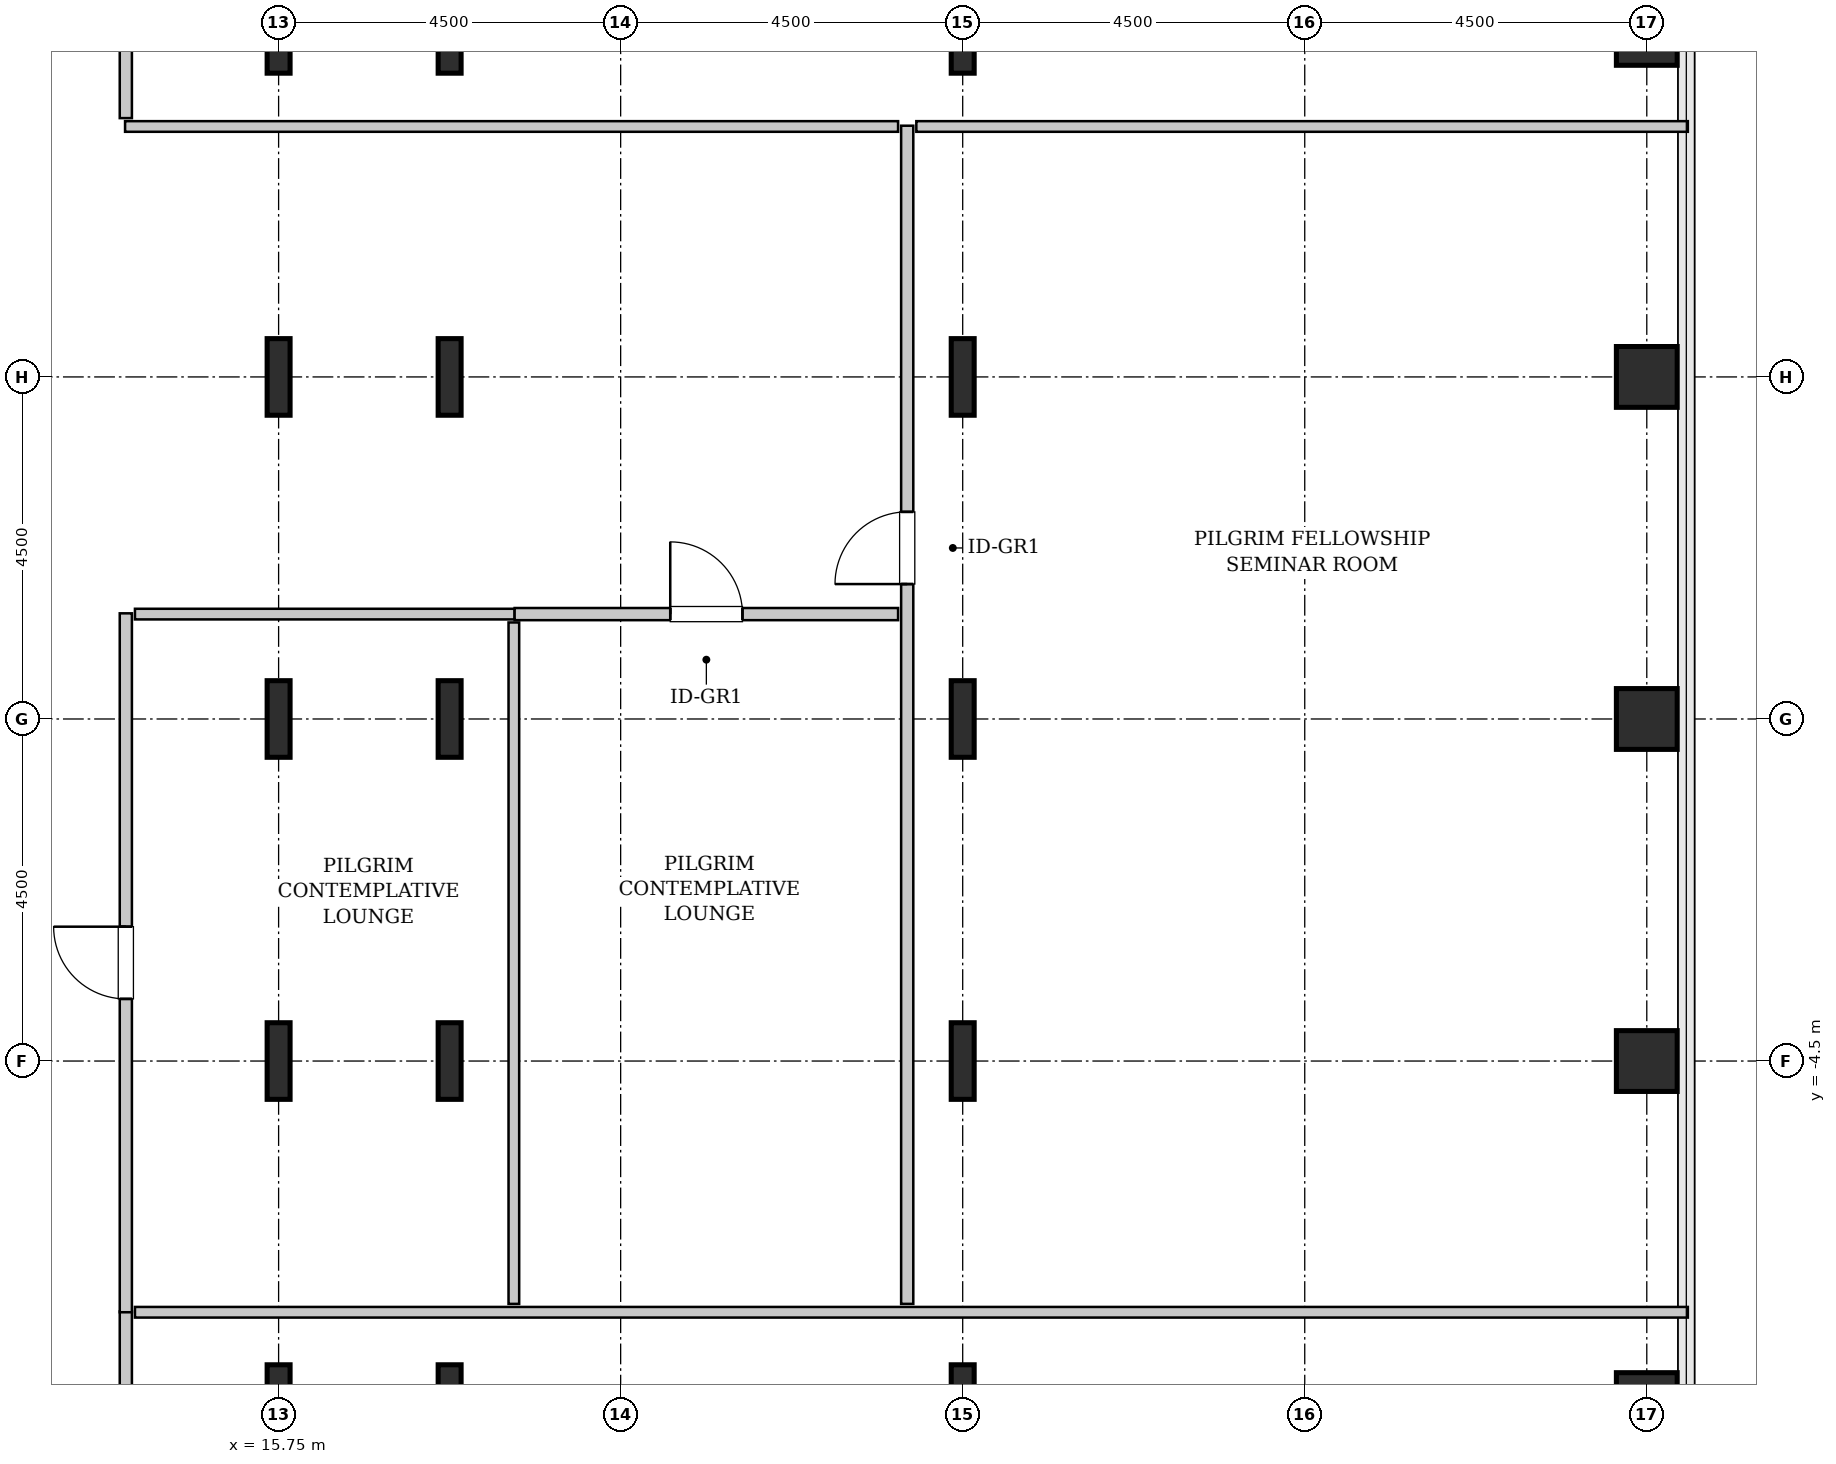
"""IFC4 building model, lengths in metres.
Left out: names, types, materials, properties, quantities, classifications, styles, units other than length and angle.
Written with IfcOpenShell. Run it as: python <this file> out.ifc"""

import sys

from ifc_helpers import new_model, si_unit, direction, frame, frame_2d, origin, origin_2d, place, context, subcontext, project, spatial, rectangle, hollow_rectangle, i_section, extrude, source, transform, mapped, element, fill, save


model = new_model("IFC4")
c1 = context("Model", 3, precision=1e-05, world=origin(), true_north=direction((0.0, 1.0)))
c2 = subcontext(c1, "Body", "Model", "MODEL_VIEW")
j1 = project(units=[si_unit("LENGTHUNIT", "METRE"), si_unit("PLANEANGLEUNIT", "RADIAN")], contexts=[c1])
p1 = place(None, origin())
s1 = spatial("IfcSite", under=j1, at=p1, CompositionType="ELEMENT")
p2 = place(p1, origin())
s2 = spatial("IfcBuilding", under=s1, at=p2, CompositionType="ELEMENT")
p3 = place(p2, frame((0.0, 0.0, 117.4)))
s3 = spatial("IfcBuildingStorey", under=s2, at=p3, CompositionType="ELEMENT", Elevation=117.4)
m1 = source(origin(), c2, "Body", "SweptSolid", [
    extrude(i_section(OverallWidth=0.302, OverallDepth=1.008, WebThickness=0.021, FlangeThickness=0.04, FilletRadius=0.03, at=origin_2d()), origin(), (0.0, 0.0, 1.0), 3.8),
])
for number, where, z_axis, x_axis in (
    (1, (15.75, -9.0, 0.0), (0.0, 0.0, 1.0), (1.0, 0.0, 0.0)),
    (2, (15.75, -4.5, 0.0), (0.0, 0.0, 1.0), (1.0, 0.0, 0.0)),
    (3, (15.75, 0.0, 0.0), (0.0, 0.0, 1.0), (1.0, 0.0, 0.0)),
    (4, (15.75, 4.5, 0.0), (0.0, 0.0, 1.0), (1.0, 0.0, 0.0)),
    (5, (15.75, 9.0, 0.0), (0.0, 0.0, 1.0), (1.0, 0.0, 0.0)),
    (6, (18.0, -9.0, 0.0), (0.0, 0.0, 1.0), (1.0, 0.0, 0.0)),
    (7, (18.0, -4.5, 0.0), (0.0, 0.0, 1.0), (1.0, 0.0, 0.0)),
    (8, (18.0, 0.0, 0.0), (0.0, 0.0, 1.0), (1.0, 0.0, 0.0)),
    (9, (18.0, 4.5, 0.0), (0.0, 0.0, 1.0), (1.0, 0.0, 0.0)),
    (10, (18.0, 9.0, 0.0), (0.0, 0.0, 1.0), (1.0, 0.0, 0.0)),
    (11, (24.75, -9.0, 0.0), (0.0, 0.0, 1.0), (1.0, 0.0, 0.0)),
    (12, (24.75, -4.5, 0.0), (0.0, 0.0, 1.0), (1.0, 0.0, 0.0)),
    (13, (24.75, 0.0, 0.0), (0.0, 0.0, 1.0), (1.0, 0.0, 0.0)),
    (14, (24.75, 4.5, 0.0), (0.0, 0.0, 1.0), (1.0, 0.0, 0.0)),
    (15, (24.75, 9.0, 0.0), (0.0, 0.0, 1.0), (1.0, 0.0, 0.0)),
):
    element("IfcColumn", number, at=place(p3, frame(where, z_axis=z_axis, x_axis=x_axis)), inside=s3, PredefinedType="COLUMN", context=c2, shape_type="MappedRepresentation", body=[
        mapped(m1, transform((0.0, 0.0, 0.0), x_axis=(1.0, 0.0, 0.0), y_axis=(0.0, 1.0, 0.0), z_axis=(0.0, 0.0, 1.0), scale=1.0)),
    ])
m2 = source(origin(), c2, "Body", "SweptSolid", [
    extrude(hollow_rectangle(XDim=0.8, YDim=0.8, WallThickness=0.04, InnerFilletRadius=0.04, OuterFilletRadius=0.08, at=origin_2d()), origin(), (0.0, 0.0, 1.0), 3.8),
])
for number, where, z_axis, x_axis in (
    (16, (33.75, -9.0, 0.0), (0.0, 0.0, 1.0), (1.0, 0.0, 0.0)),
    (17, (33.75, -4.5, 0.0), (0.0, 0.0, 1.0), (1.0, 0.0, 0.0)),
    (18, (33.75, 0.0, 0.0), (0.0, 0.0, 1.0), (1.0, 0.0, 0.0)),
    (19, (33.75, 4.5, 0.0), (0.0, 0.0, 1.0), (1.0, 0.0, 0.0)),
    (20, (33.75, 9.0, 0.0), (0.0, 0.0, 1.0), (1.0, 0.0, 0.0)),
):
    element("IfcColumn", number, at=place(p3, frame(where, z_axis=z_axis, x_axis=x_axis)), inside=s3, PredefinedType="COLUMN", context=c2, shape_type="MappedRepresentation", body=[
        mapped(m2, transform((0.0, 0.0, 0.0), x_axis=(1.0, 0.0, 0.0), y_axis=(0.0, 1.0, 0.0), z_axis=(0.0, 0.0, 1.0), scale=1.0)),
    ])
m3 = source(origin(), c2, "Body", "SweptSolid", [
    extrude(rectangle(XDim=15.245, YDim=0.16, at=frame_2d((7.623, 0.0))), origin(), (0.0, 0.0, 1.0), 3.535),
])
p4 = place(p3, frame((13.74, -23.04, 0.0), z_axis=(0.0, 0.0, 1.0), x_axis=(0.0, 1.0, 0.0)))
e21 = element("IfcWall", 21, at=p4, inside=s3, PredefinedType="PARTITIONING", context=c2, shape_type="MappedRepresentation", body=[
    mapped(m3, transform((0.0, 0.0, 0.0), x_axis=(1.0, 0.0, 0.0), y_axis=(0.0, 1.0, 0.0), z_axis=(0.0, 0.0, 1.0), scale=1.0)),
])
p5 = place(p4, frame((12.913, 0.0, 0.0)))
e22 = element("IfcOpeningElement", 22, at=p5, cuts=e21, PredefinedType="OPENING", context=c2, shape_type="SweptSolid", body=[
    extrude(rectangle(XDim=0.95, YDim=2.1, at=frame_2d((0.475, 1.05))), frame((0.0, 0.09, 0.0), z_axis=(0.0, -1.0, 0.0), x_axis=(1.0, 0.0, 0.0)), (0.0, 0.0, 1.0), 0.18),
])
m4 = source(origin(), c2, "Body", "SweptSolid", [
    extrude(rectangle(XDim=20.43, YDim=0.14, at=frame_2d((10.215, 0.0))), origin(), (0.0, 0.0, 1.0), 3.535),
])
p6 = place(p3, frame((13.86, -7.805, 0.0), z_axis=(0.0, 0.0, 1.0), x_axis=(1.0, 0.0, 0.0)))
e23 = element("IfcWall", 23, at=p6, inside=s3, PredefinedType="PARTITIONING", context=c2, shape_type="MappedRepresentation", body=[
    mapped(m4, transform((0.0, 0.0, 0.0), x_axis=(1.0, 0.0, 0.0), y_axis=(0.0, 1.0, 0.0), z_axis=(0.0, 0.0, 1.0), scale=1.0)),
])
m5 = source(origin(), c2, "Body", "SweptSolid", [
    extrude(rectangle(XDim=15.5, YDim=0.16, at=frame_2d((7.75, 0.0))), origin(), (0.0, 0.0, 1.0), 3.535),
])
p7 = place(p3, frame((24.02, -7.695, 0.0), z_axis=(0.0, 0.0, 1.0), x_axis=(0.0, 1.0, 0.0)))
e24 = element("IfcWall", 24, at=p7, inside=s3, PredefinedType="PARTITIONING", context=c2, shape_type="MappedRepresentation", body=[
    mapped(m5, transform((0.0, 0.0, 0.0), x_axis=(1.0, 0.0, 0.0), y_axis=(0.0, 1.0, 0.0), z_axis=(0.0, 0.0, 1.0), scale=1.0)),
])
p8 = place(p7, frame((9.47, 0.0, 0.0)))
e25 = element("IfcOpeningElement", 25, at=p8, cuts=e24, PredefinedType="OPENING", context=c2, shape_type="SweptSolid", body=[
    extrude(rectangle(XDim=0.95, YDim=2.1, at=frame_2d((0.475, 1.05))), frame((0.0, 0.09, 0.0), z_axis=(0.0, -1.0, 0.0), x_axis=(1.0, 0.0, 0.0)), (0.0, 0.0, 1.0), 0.18),
])
m6 = source(origin(), c2, "Body", "SweptSolid", [
    extrude(rectangle(XDim=10.17, YDim=0.14, at=frame_2d((5.085, 0.0))), origin(), (0.0, 0.0, 1.0), 3.535),
])
p9 = place(p3, frame((13.73, 7.795, 0.0), z_axis=(0.0, 0.0, 1.0), x_axis=(1.0, 0.0, 0.0)))
e26 = element("IfcWall", 26, at=p9, inside=s3, PredefinedType="PARTITIONING", context=c2, shape_type="MappedRepresentation", body=[
    mapped(m6, transform((0.0, 0.0, 0.0), x_axis=(1.0, 0.0, 0.0), y_axis=(0.0, 1.0, 0.0), z_axis=(0.0, 0.0, 1.0), scale=1.0)),
])
m7 = source(origin(), c2, "Body", "SweptSolid", [
    extrude(rectangle(XDim=10.15, YDim=0.14, at=frame_2d((5.075, 0.0))), origin(), (0.0, 0.0, 1.0), 3.535),
])
p10 = place(p3, frame((24.14, 7.795, 0.0), z_axis=(0.0, 0.0, 1.0), x_axis=(1.0, 0.0, 0.0)))
e27 = element("IfcWall", 27, at=p10, inside=s3, PredefinedType="PARTITIONING", context=c2, shape_type="MappedRepresentation", body=[
    mapped(m7, transform((0.0, 0.0, 0.0), x_axis=(1.0, 0.0, 0.0), y_axis=(0.0, 1.0, 0.0), z_axis=(0.0, 0.0, 1.0), scale=1.0)),
])
m8 = source(origin(), c2, "Body", "SweptSolid", [
    extrude(rectangle(XDim=9.195, YDim=0.16, at=frame_2d((4.597, 0.0))), origin(), (0.0, 0.0, 1.0), 3.535),
])
p11 = place(p3, frame((13.74, -7.805, 0.0), z_axis=(0.0, 0.0, 1.0), x_axis=(0.0, 1.0, 0.0)))
e28 = element("IfcWall", 28, at=p11, inside=s3, PredefinedType="PARTITIONING", context=c2, shape_type="MappedRepresentation", body=[
    mapped(m8, transform((0.0, 0.0, 0.0), x_axis=(1.0, 0.0, 0.0), y_axis=(0.0, 1.0, 0.0), z_axis=(0.0, 0.0, 1.0), scale=1.0)),
])
p12 = place(p11, frame((4.123, 0.0, 0.0)))
e29 = element("IfcOpeningElement", 29, at=p12, cuts=e28, PredefinedType="OPENING", context=c2, shape_type="SweptSolid", body=[
    extrude(rectangle(XDim=0.95, YDim=2.1, at=frame_2d((0.475, 1.05))), frame((0.0, 0.09, 0.0), z_axis=(0.0, -1.0, 0.0), x_axis=(1.0, 0.0, 0.0)), (0.0, 0.0, 1.0), 0.18),
])
m9 = source(origin(), c2, "Body", "SweptSolid", [
    extrude(rectangle(XDim=4.995, YDim=0.14, at=frame_2d((2.498, 0.0))), origin(), (0.0, 0.0, 1.0), 3.535),
])
p13 = place(p3, frame((13.86, 1.38, 0.0), z_axis=(0.0, 0.0, 1.0), x_axis=(1.0, 0.0, 0.0)))
e30 = element("IfcWall", 30, at=p13, inside=s3, PredefinedType="PARTITIONING", context=c2, shape_type="MappedRepresentation", body=[
    mapped(m9, transform((0.0, 0.0, 0.0), x_axis=(1.0, 0.0, 0.0), y_axis=(0.0, 1.0, 0.0), z_axis=(0.0, 0.0, 1.0), scale=1.0)),
])
m10 = source(origin(), c2, "Body", "SweptSolid", [
    extrude(rectangle(XDim=8.965, YDim=0.14, at=frame_2d((4.482, 0.0))), origin(), (0.0, 0.0, 1.0), 3.535),
])
p14 = place(p3, frame((18.845, -7.695, 0.0), z_axis=(0.0, 0.0, 1.0), x_axis=(0.0, 1.0, 0.0)))
e31 = element("IfcWall", 31, at=p14, inside=s3, PredefinedType="PARTITIONING", context=c2, shape_type="MappedRepresentation", body=[
    mapped(m10, transform((0.0, 0.0, 0.0), x_axis=(1.0, 0.0, 0.0), y_axis=(0.0, 1.0, 0.0), z_axis=(0.0, 0.0, 1.0), scale=1.0)),
])
m11 = source(origin(), c2, "Body", "SweptSolid", [
    extrude(rectangle(XDim=5.045, YDim=0.16, at=frame_2d((2.522, 0.0))), origin(), (0.0, 0.0, 1.0), 3.535),
])
p15 = place(p3, frame((18.855, 1.38, 0.0), z_axis=(0.0, 0.0, 1.0), x_axis=(1.0, 0.0, 0.0)))
e32 = element("IfcWall", 32, at=p15, inside=s3, PredefinedType="PARTITIONING", context=c2, shape_type="MappedRepresentation", body=[
    mapped(m11, transform((0.0, 0.0, 0.0), x_axis=(1.0, 0.0, 0.0), y_axis=(0.0, 1.0, 0.0), z_axis=(0.0, 0.0, 1.0), scale=1.0)),
])
p16 = place(p15, frame((2.048, 0.0, 0.0)))
e33 = element("IfcOpeningElement", 33, at=p16, cuts=e32, PredefinedType="OPENING", context=c2, shape_type="SweptSolid", body=[
    extrude(rectangle(XDim=0.95, YDim=2.1, at=frame_2d((0.475, 1.05))), frame((0.0, 0.09, 0.0), z_axis=(0.0, -1.0, 0.0), x_axis=(1.0, 0.0, 0.0)), (0.0, 0.0, 1.0), 0.18),
])
m12 = source(origin(), c2, "Body", "SweptSolid", [
    extrude(rectangle(XDim=15.135, YDim=0.16, at=frame_2d((7.567, 0.0))), origin(), (0.0, 0.0, 1.0), 3.535),
])
p17 = place(p3, frame((13.74, 7.905, 0.0), z_axis=(0.0, 0.0, 1.0), x_axis=(0.0, 1.0, 0.0)))
e34 = element("IfcWall", 34, at=p17, inside=s3, PredefinedType="PARTITIONING", context=c2, shape_type="MappedRepresentation", body=[
    mapped(m12, transform((0.0, 0.0, 0.0), x_axis=(1.0, 0.0, 0.0), y_axis=(0.0, 1.0, 0.0), z_axis=(0.0, 0.0, 1.0), scale=1.0)),
])
p18 = place(p17, frame((1.327, 0.0, 0.0)))
e35 = element("IfcOpeningElement", 35, at=p18, cuts=e34, PredefinedType="OPENING", context=c2, shape_type="SweptSolid", body=[
    extrude(rectangle(XDim=0.95, YDim=2.1, at=frame_2d((0.475, 1.05))), frame((0.0, 0.09, 0.0), z_axis=(0.0, -1.0, 0.0), x_axis=(1.0, 0.0, 0.0)), (0.0, 0.0, 1.0), 0.18),
])
m13 = source(origin(), c2, "Body", "SweptSolid", [
    extrude(rectangle(XDim=0.95, YDim=2.1, at=frame_2d((0.475, 1.05))), frame((0.0, 0.025, 0.0), z_axis=(0.0, -1.0, 0.0), x_axis=(1.0, 0.0, 0.0)), (0.0, 0.0, 1.0), 0.05),
])
p19 = place(p8, origin())
e36 = element("IfcDoor", 36, at=p19, inside=s3, OperationType="SINGLE_SWING_LEFT", PredefinedType="DOOR", context=c2, shape_type="MappedRepresentation", body=[
    mapped(m13, transform((0.0, 0.0, 0.0), x_axis=(1.0, 0.0, 0.0), y_axis=(0.0, 1.0, 0.0), z_axis=(0.0, 0.0, 1.0), scale=1.0)),
])
fill(e25, e36)
p20 = place(p12, origin())
e37 = element("IfcDoor", 37, at=p20, inside=s3, OperationType="SINGLE_SWING_RIGHT", PredefinedType="DOOR", context=c2, shape_type="MappedRepresentation", body=[
    mapped(m13, transform((0.0, 0.0, 0.0), x_axis=(1.0, 0.0, 0.0), y_axis=(0.0, 1.0, 0.0), z_axis=(0.0, 0.0, 1.0), scale=1.0)),
])
fill(e29, e37)
p21 = place(p16, origin())
e38 = element("IfcDoor", 38, at=p21, inside=s3, OperationType="SINGLE_SWING_LEFT", PredefinedType="DOOR", context=c2, shape_type="MappedRepresentation", body=[
    mapped(m13, transform((0.0, 0.0, 0.0), x_axis=(1.0, 0.0, 0.0), y_axis=(0.0, 1.0, 0.0), z_axis=(0.0, 0.0, 1.0), scale=1.0)),
])
fill(e33, e38)
save(model, sys.argv[1])
